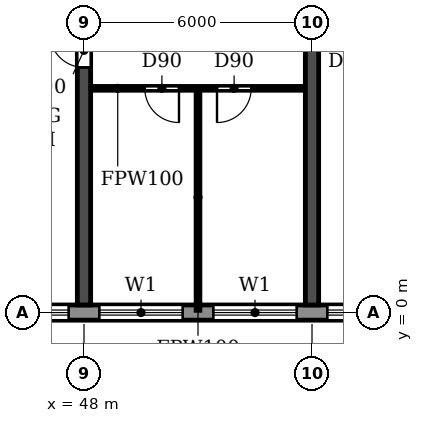
"""IFC4 building model, lengths in metres.
Left out: names, types, materials, properties, quantities, classifications, styles, units other than length and angle.
Written with IfcOpenShell. Run it as: python <this file> out.ifc"""

import sys

from ifc_helpers import new_model, si_unit, direction, frame, frame_2d, origin, place, context, subcontext, project, spatial, rectangle, extrude, element, fill, save


model = new_model("IFC4")
c1 = context("Model", 3, precision=1e-05, world=origin(), true_north=direction((0.0, 1.0)))
c2 = subcontext(c1, "Body", "Model", "MODEL_VIEW")
j1 = project(units=[si_unit("LENGTHUNIT", "METRE"), si_unit("PLANEANGLEUNIT", "RADIAN")], contexts=[c1])
p1 = place(None, origin())
s1 = spatial("IfcSite", under=j1, at=p1, CompositionType="ELEMENT")
p2 = place(p1, origin())
s2 = spatial("IfcBuilding", under=s1, at=p2, CompositionType="ELEMENT")
p3 = place(p2, frame((0.0, 0.0, 102.6)))
s3 = spatial("IfcBuildingStorey", under=s2, at=p3, CompositionType="ELEMENT", Elevation=102.6)
p4 = place(p3, frame((48.0, 0.2, 0.0), z_axis=(0.0, 0.0, 1.0), x_axis=(0.0, 1.0, 0.0)))
e1 = element("IfcWall", 1, at=p4, inside=s3, PredefinedType="SHEAR", context=c2, shape_type="SweptSolid", body=[
    extrude(rectangle(XDim=11.675, YDim=0.35, at=frame_2d((5.837, 0.0))), origin(), (0.0, 0.0, 1.0), 3.0),
])
p5 = place(p4, frame((6.25, 0.0, 0.0)))
e2 = element("IfcOpeningElement", 2, at=p5, cuts=e1, PredefinedType="OPENING", context=c2, shape_type="SweptSolid", body=[
    extrude(rectangle(XDim=0.9, YDim=2.1, at=frame_2d((0.45, 1.05))), frame((0.0, 0.185, 0.0), z_axis=(0.0, -1.0, 0.0), x_axis=(1.0, 0.0, 0.0)), (0.0, 0.0, 1.0), 0.37),
])
p6 = place(p3, frame((54.0, 0.2, 0.0), z_axis=(0.0, 0.0, 1.0), x_axis=(0.0, 1.0, 0.0)))
e3 = element("IfcWall", 3, at=p6, inside=s3, PredefinedType="SHEAR", context=c2, shape_type="SweptSolid", body=[
    extrude(rectangle(XDim=11.675, YDim=0.35, at=frame_2d((5.837, 0.0))), origin(), (0.0, 0.0, 1.0), 3.0),
])
p7 = place(p3, frame((10.683, 0.0, 0.0), z_axis=(0.0, 0.0, 1.0), x_axis=(1.0, 0.0, 0.0)))
e4 = element("IfcWall", 4, at=p7, inside=s3, PredefinedType="STANDARD", context=c2, shape_type="SweptSolid", body=[
    extrude(rectangle(XDim=80.634, YDim=0.4, at=frame_2d((40.317, 0.0))), origin(), (0.0, 0.0, 1.0), 3.0),
])
p8 = place(p7, frame((1.717, 0.0, 0.9)))
e5 = element("IfcOpeningElement", 5, at=p8, cuts=e4, PredefinedType="OPENING", context=c2, shape_type="SweptSolid", body=[
    extrude(rectangle(XDim=2.2, YDim=1.5, at=frame_2d((1.1, 0.75))), frame((0.0, 0.21, 0.0), z_axis=(0.0, -1.0, 0.0), x_axis=(1.0, 0.0, 0.0)), (0.0, 0.0, 1.0), 0.42),
])
p9 = place(p7, frame((4.917, 0.0, 0.0)))
e6 = element("IfcOpeningElement", 6, at=p9, cuts=e4, PredefinedType="OPENING", context=c2, shape_type="SweptSolid", body=[
    extrude(rectangle(XDim=1.8, YDim=2.4, at=frame_2d((0.9, 1.2))), frame((0.0, 0.21, 0.0), z_axis=(0.0, -1.0, 0.0), x_axis=(1.0, 0.0, 0.0)), (0.0, 0.0, 1.0), 0.42),
])
p10 = place(p7, frame((7.717, 0.0, 0.9)))
e7 = element("IfcOpeningElement", 7, at=p10, cuts=e4, PredefinedType="OPENING", context=c2, shape_type="SweptSolid", body=[
    extrude(rectangle(XDim=2.2, YDim=1.5, at=frame_2d((1.1, 0.75))), frame((0.0, 0.21, 0.0), z_axis=(0.0, -1.0, 0.0), x_axis=(1.0, 0.0, 0.0)), (0.0, 0.0, 1.0), 0.42),
])
p11 = place(p7, frame((10.717, 0.0, 0.9)))
e8 = element("IfcOpeningElement", 8, at=p11, cuts=e4, PredefinedType="OPENING", context=c2, shape_type="SweptSolid", body=[
    extrude(rectangle(XDim=2.2, YDim=1.5, at=frame_2d((1.1, 0.75))), frame((0.0, 0.21, 0.0), z_axis=(0.0, -1.0, 0.0), x_axis=(1.0, 0.0, 0.0)), (0.0, 0.0, 1.0), 0.42),
])
p12 = place(p7, frame((13.717, 0.0, 0.9)))
e9 = element("IfcOpeningElement", 9, at=p12, cuts=e4, PredefinedType="OPENING", context=c2, shape_type="SweptSolid", body=[
    extrude(rectangle(XDim=2.2, YDim=1.5, at=frame_2d((1.1, 0.75))), frame((0.0, 0.21, 0.0), z_axis=(0.0, -1.0, 0.0), x_axis=(1.0, 0.0, 0.0)), (0.0, 0.0, 1.0), 0.42),
])
p13 = place(p7, frame((16.717, 0.0, 0.9)))
e10 = element("IfcOpeningElement", 10, at=p13, cuts=e4, PredefinedType="OPENING", context=c2, shape_type="SweptSolid", body=[
    extrude(rectangle(XDim=2.2, YDim=1.5, at=frame_2d((1.1, 0.75))), frame((0.0, 0.21, 0.0), z_axis=(0.0, -1.0, 0.0), x_axis=(1.0, 0.0, 0.0)), (0.0, 0.0, 1.0), 0.42),
])
p14 = place(p7, frame((19.717, 0.0, 0.9)))
e11 = element("IfcOpeningElement", 11, at=p14, cuts=e4, PredefinedType="OPENING", context=c2, shape_type="SweptSolid", body=[
    extrude(rectangle(XDim=2.2, YDim=1.5, at=frame_2d((1.1, 0.75))), frame((0.0, 0.21, 0.0), z_axis=(0.0, -1.0, 0.0), x_axis=(1.0, 0.0, 0.0)), (0.0, 0.0, 1.0), 0.42),
])
p15 = place(p7, frame((22.717, 0.0, 0.9)))
e12 = element("IfcOpeningElement", 12, at=p15, cuts=e4, PredefinedType="OPENING", context=c2, shape_type="SweptSolid", body=[
    extrude(rectangle(XDim=2.2, YDim=1.5, at=frame_2d((1.1, 0.75))), frame((0.0, 0.21, 0.0), z_axis=(0.0, -1.0, 0.0), x_axis=(1.0, 0.0, 0.0)), (0.0, 0.0, 1.0), 0.42),
])
p16 = place(p7, frame((25.717, 0.0, 0.9)))
e13 = element("IfcOpeningElement", 13, at=p16, cuts=e4, PredefinedType="OPENING", context=c2, shape_type="SweptSolid", body=[
    extrude(rectangle(XDim=2.2, YDim=1.5, at=frame_2d((1.1, 0.75))), frame((0.0, 0.21, 0.0), z_axis=(0.0, -1.0, 0.0), x_axis=(1.0, 0.0, 0.0)), (0.0, 0.0, 1.0), 0.42),
])
p17 = place(p7, frame((28.917, 0.0, 0.0)))
e14 = element("IfcOpeningElement", 14, at=p17, cuts=e4, PredefinedType="OPENING", context=c2, shape_type="SweptSolid", body=[
    extrude(rectangle(XDim=1.8, YDim=2.4, at=frame_2d((0.9, 1.2))), frame((0.0, 0.21, 0.0), z_axis=(0.0, -1.0, 0.0), x_axis=(1.0, 0.0, 0.0)), (0.0, 0.0, 1.0), 0.42),
])
p18 = place(p7, frame((31.717, 0.0, 0.9)))
e15 = element("IfcOpeningElement", 15, at=p18, cuts=e4, PredefinedType="OPENING", context=c2, shape_type="SweptSolid", body=[
    extrude(rectangle(XDim=2.2, YDim=1.5, at=frame_2d((1.1, 0.75))), frame((0.0, 0.21, 0.0), z_axis=(0.0, -1.0, 0.0), x_axis=(1.0, 0.0, 0.0)), (0.0, 0.0, 1.0), 0.42),
])
p19 = place(p7, frame((34.717, 0.0, 0.9)))
e16 = element("IfcOpeningElement", 16, at=p19, cuts=e4, PredefinedType="OPENING", context=c2, shape_type="SweptSolid", body=[
    extrude(rectangle(XDim=2.2, YDim=1.5, at=frame_2d((1.1, 0.75))), frame((0.0, 0.21, 0.0), z_axis=(0.0, -1.0, 0.0), x_axis=(1.0, 0.0, 0.0)), (0.0, 0.0, 1.0), 0.42),
])
p20 = place(p7, frame((37.717, 0.0, 0.9)))
e17 = element("IfcOpeningElement", 17, at=p20, cuts=e4, PredefinedType="OPENING", context=c2, shape_type="SweptSolid", body=[
    extrude(rectangle(XDim=2.2, YDim=1.5, at=frame_2d((1.1, 0.75))), frame((0.0, 0.21, 0.0), z_axis=(0.0, -1.0, 0.0), x_axis=(1.0, 0.0, 0.0)), (0.0, 0.0, 1.0), 0.42),
])
p21 = place(p7, frame((40.717, 0.0, 0.9)))
e18 = element("IfcOpeningElement", 18, at=p21, cuts=e4, PredefinedType="OPENING", context=c2, shape_type="SweptSolid", body=[
    extrude(rectangle(XDim=2.2, YDim=1.5, at=frame_2d((1.1, 0.75))), frame((0.0, 0.21, 0.0), z_axis=(0.0, -1.0, 0.0), x_axis=(1.0, 0.0, 0.0)), (0.0, 0.0, 1.0), 0.42),
])
p22 = place(p7, frame((43.717, 0.0, 0.9)))
e19 = element("IfcOpeningElement", 19, at=p22, cuts=e4, PredefinedType="OPENING", context=c2, shape_type="SweptSolid", body=[
    extrude(rectangle(XDim=2.2, YDim=1.5, at=frame_2d((1.1, 0.75))), frame((0.0, 0.21, 0.0), z_axis=(0.0, -1.0, 0.0), x_axis=(1.0, 0.0, 0.0)), (0.0, 0.0, 1.0), 0.42),
])
p23 = place(p7, frame((46.717, 0.0, 0.9)))
e20 = element("IfcOpeningElement", 20, at=p23, cuts=e4, PredefinedType="OPENING", context=c2, shape_type="SweptSolid", body=[
    extrude(rectangle(XDim=2.2, YDim=1.5, at=frame_2d((1.1, 0.75))), frame((0.0, 0.21, 0.0), z_axis=(0.0, -1.0, 0.0), x_axis=(1.0, 0.0, 0.0)), (0.0, 0.0, 1.0), 0.42),
])
p24 = place(p7, frame((49.917, 0.0, 0.0)))
e21 = element("IfcOpeningElement", 21, at=p24, cuts=e4, PredefinedType="OPENING", context=c2, shape_type="SweptSolid", body=[
    extrude(rectangle(XDim=1.8, YDim=2.4, at=frame_2d((0.9, 1.2))), frame((0.0, 0.21, 0.0), z_axis=(0.0, -1.0, 0.0), x_axis=(1.0, 0.0, 0.0)), (0.0, 0.0, 1.0), 0.42),
])
p25 = place(p7, frame((52.717, 0.0, 0.9)))
e22 = element("IfcOpeningElement", 22, at=p25, cuts=e4, PredefinedType="OPENING", context=c2, shape_type="SweptSolid", body=[
    extrude(rectangle(XDim=2.2, YDim=1.5, at=frame_2d((1.1, 0.75))), frame((0.0, 0.21, 0.0), z_axis=(0.0, -1.0, 0.0), x_axis=(1.0, 0.0, 0.0)), (0.0, 0.0, 1.0), 0.42),
])
p26 = place(p7, frame((55.717, 0.0, 0.9)))
e23 = element("IfcOpeningElement", 23, at=p26, cuts=e4, PredefinedType="OPENING", context=c2, shape_type="SweptSolid", body=[
    extrude(rectangle(XDim=2.2, YDim=1.5, at=frame_2d((1.1, 0.75))), frame((0.0, 0.21, 0.0), z_axis=(0.0, -1.0, 0.0), x_axis=(1.0, 0.0, 0.0)), (0.0, 0.0, 1.0), 0.42),
])
p27 = place(p7, frame((58.717, 0.0, 0.9)))
e24 = element("IfcOpeningElement", 24, at=p27, cuts=e4, PredefinedType="OPENING", context=c2, shape_type="SweptSolid", body=[
    extrude(rectangle(XDim=2.2, YDim=1.5, at=frame_2d((1.1, 0.75))), frame((0.0, 0.21, 0.0), z_axis=(0.0, -1.0, 0.0), x_axis=(1.0, 0.0, 0.0)), (0.0, 0.0, 1.0), 0.42),
])
p28 = place(p7, frame((61.717, 0.0, 0.9)))
e25 = element("IfcOpeningElement", 25, at=p28, cuts=e4, PredefinedType="OPENING", context=c2, shape_type="SweptSolid", body=[
    extrude(rectangle(XDim=2.2, YDim=1.5, at=frame_2d((1.1, 0.75))), frame((0.0, 0.21, 0.0), z_axis=(0.0, -1.0, 0.0), x_axis=(1.0, 0.0, 0.0)), (0.0, 0.0, 1.0), 0.42),
])
p29 = place(p7, frame((64.717, 0.0, 0.9)))
e26 = element("IfcOpeningElement", 26, at=p29, cuts=e4, PredefinedType="OPENING", context=c2, shape_type="SweptSolid", body=[
    extrude(rectangle(XDim=2.2, YDim=1.5, at=frame_2d((1.1, 0.75))), frame((0.0, 0.21, 0.0), z_axis=(0.0, -1.0, 0.0), x_axis=(1.0, 0.0, 0.0)), (0.0, 0.0, 1.0), 0.42),
])
p30 = place(p7, frame((67.717, 0.0, 0.9)))
e27 = element("IfcOpeningElement", 27, at=p30, cuts=e4, PredefinedType="OPENING", context=c2, shape_type="SweptSolid", body=[
    extrude(rectangle(XDim=2.2, YDim=1.5, at=frame_2d((1.1, 0.75))), frame((0.0, 0.21, 0.0), z_axis=(0.0, -1.0, 0.0), x_axis=(1.0, 0.0, 0.0)), (0.0, 0.0, 1.0), 0.42),
])
p31 = place(p7, frame((70.717, 0.0, 0.9)))
e28 = element("IfcOpeningElement", 28, at=p31, cuts=e4, PredefinedType="OPENING", context=c2, shape_type="SweptSolid", body=[
    extrude(rectangle(XDim=2.2, YDim=1.5, at=frame_2d((1.1, 0.75))), frame((0.0, 0.21, 0.0), z_axis=(0.0, -1.0, 0.0), x_axis=(1.0, 0.0, 0.0)), (0.0, 0.0, 1.0), 0.42),
])
p32 = place(p7, frame((73.717, 0.0, 0.9)))
e29 = element("IfcOpeningElement", 29, at=p32, cuts=e4, PredefinedType="OPENING", context=c2, shape_type="SweptSolid", body=[
    extrude(rectangle(XDim=2.2, YDim=1.5, at=frame_2d((1.1, 0.75))), frame((0.0, 0.21, 0.0), z_axis=(0.0, -1.0, 0.0), x_axis=(1.0, 0.0, 0.0)), (0.0, 0.0, 1.0), 0.42),
])
p33 = place(p7, frame((76.917, 0.0, 0.0)))
e30 = element("IfcOpeningElement", 30, at=p33, cuts=e4, PredefinedType="OPENING", context=c2, shape_type="SweptSolid", body=[
    extrude(rectangle(XDim=1.8, YDim=2.4, at=frame_2d((0.9, 1.2))), frame((0.0, 0.21, 0.0), z_axis=(0.0, -1.0, 0.0), x_axis=(1.0, 0.0, 0.0)), (0.0, 0.0, 1.0), 0.42),
])
p34 = place(p3, frame((48.185, 5.9, 0.0), z_axis=(0.0, 0.0, 1.0), x_axis=(1.0, 0.0, 0.0)))
e31 = element("IfcWall", 31, at=p34, inside=s3, PredefinedType="PARTITIONING", context=c2, shape_type="SweptSolid", body=[
    extrude(rectangle(XDim=5.63, YDim=0.1, at=frame_2d((2.815, 0.0))), origin(), (0.0, 0.0, 1.0), 3.0),
])
p35 = place(p34, frame((1.415, 0.0, 0.0)))
e32 = element("IfcOpeningElement", 32, at=p35, cuts=e31, PredefinedType="OPENING", context=c2, shape_type="SweptSolid", body=[
    extrude(rectangle(XDim=0.9, YDim=2.1, at=frame_2d((0.45, 1.05))), frame((0.0, 0.06, 0.0), z_axis=(0.0, -1.0, 0.0), x_axis=(1.0, 0.0, 0.0)), (0.0, 0.0, 1.0), 0.12),
])
p36 = place(p34, frame((3.315, 0.0, 0.0)))
e33 = element("IfcOpeningElement", 33, at=p36, cuts=e31, PredefinedType="OPENING", context=c2, shape_type="SweptSolid", body=[
    extrude(rectangle(XDim=0.9, YDim=2.1, at=frame_2d((0.45, 1.05))), frame((0.0, 0.06, 0.0), z_axis=(0.0, -1.0, 0.0), x_axis=(1.0, 0.0, 0.0)), (0.0, 0.0, 1.0), 0.12),
])
p37 = place(p3, frame((51.0, 0.06, 0.0), z_axis=(0.0, 0.0, 1.0), x_axis=(0.0, 1.0, 0.0)))
e34 = element("IfcWall", 34, at=p37, inside=s3, PredefinedType="PARTITIONING", context=c2, shape_type="SweptSolid", body=[
    extrude(rectangle(XDim=5.79, YDim=0.1, at=frame_2d((2.895, 0.0))), origin(), (0.0, 0.0, 1.0), 3.0),
])
p38 = place(p19, origin())
e35 = element("IfcWindow", 35, at=p38, inside=s3, PartitioningType="DOUBLE_PANEL_HORIZONTAL", PredefinedType="WINDOW", context=c2, shape_type="SweptSolid", body=[
    extrude(rectangle(XDim=2.2, YDim=1.5, at=frame_2d((1.1, 0.75))), frame((0.0, 0.03, 0.0), z_axis=(0.0, -1.0, 0.0), x_axis=(1.0, 0.0, 0.0)), (0.0, 0.0, 1.0), 0.06),
])
fill(e16, e35)
p39 = place(p20, origin())
e36 = element("IfcWindow", 36, at=p39, inside=s3, PartitioningType="DOUBLE_PANEL_HORIZONTAL", PredefinedType="WINDOW", context=c2, shape_type="SweptSolid", body=[
    extrude(rectangle(XDim=2.2, YDim=1.5, at=frame_2d((1.1, 0.75))), frame((0.0, 0.03, 0.0), z_axis=(0.0, -1.0, 0.0), x_axis=(1.0, 0.0, 0.0)), (0.0, 0.0, 1.0), 0.06),
])
fill(e17, e36)
p40 = place(p21, origin())
e37 = element("IfcWindow", 37, at=p40, inside=s3, PartitioningType="DOUBLE_PANEL_HORIZONTAL", PredefinedType="WINDOW", context=c2, shape_type="SweptSolid", body=[
    extrude(rectangle(XDim=2.2, YDim=1.5, at=frame_2d((1.1, 0.75))), frame((0.0, 0.03, 0.0), z_axis=(0.0, -1.0, 0.0), x_axis=(1.0, 0.0, 0.0)), (0.0, 0.0, 1.0), 0.06),
])
fill(e18, e37)
p41 = place(p22, origin())
e38 = element("IfcWindow", 38, at=p41, inside=s3, PartitioningType="DOUBLE_PANEL_HORIZONTAL", PredefinedType="WINDOW", context=c2, shape_type="SweptSolid", body=[
    extrude(rectangle(XDim=2.2, YDim=1.5, at=frame_2d((1.1, 0.75))), frame((0.0, 0.03, 0.0), z_axis=(0.0, -1.0, 0.0), x_axis=(1.0, 0.0, 0.0)), (0.0, 0.0, 1.0), 0.06),
])
fill(e19, e38)
p42 = place(p35, frame((0.9, 0.0, 0.0), z_axis=(0.0, 0.0, 1.0), x_axis=(-1.0, 0.0, 0.0)))
e39 = element("IfcDoor", 39, at=p42, inside=s3, OperationType="SINGLE_SWING_LEFT", PredefinedType="DOOR", context=c2, shape_type="SweptSolid", body=[
    extrude(rectangle(XDim=0.9, YDim=2.1, at=frame_2d((0.45, 1.05))), frame((0.0, 0.025, 0.0), z_axis=(0.0, -1.0, 0.0), x_axis=(1.0, 0.0, 0.0)), (0.0, 0.0, 1.0), 0.05),
])
fill(e32, e39)
p43 = place(p36, frame((0.9, 0.0, 0.0), z_axis=(0.0, 0.0, 1.0), x_axis=(-1.0, 0.0, 0.0)))
e40 = element("IfcDoor", 40, at=p43, inside=s3, OperationType="SINGLE_SWING_RIGHT", PredefinedType="DOOR", context=c2, shape_type="SweptSolid", body=[
    extrude(rectangle(XDim=0.9, YDim=2.1, at=frame_2d((0.45, 1.05))), frame((0.0, 0.025, 0.0), z_axis=(0.0, -1.0, 0.0), x_axis=(1.0, 0.0, 0.0)), (0.0, 0.0, 1.0), 0.05),
])
fill(e33, e40)
p44 = place(p5, origin())
e41 = element("IfcDoor", 41, at=p44, inside=s3, OperationType="SINGLE_SWING_RIGHT", PredefinedType="DOOR", context=c2, shape_type="SweptSolid", body=[
    extrude(rectangle(XDim=0.9, YDim=2.1, at=frame_2d((0.45, 1.05))), frame((0.0, 0.025, 0.0), z_axis=(0.0, -1.0, 0.0), x_axis=(1.0, 0.0, 0.0)), (0.0, 0.0, 1.0), 0.05),
])
fill(e2, e41)
save(model, sys.argv[1])
